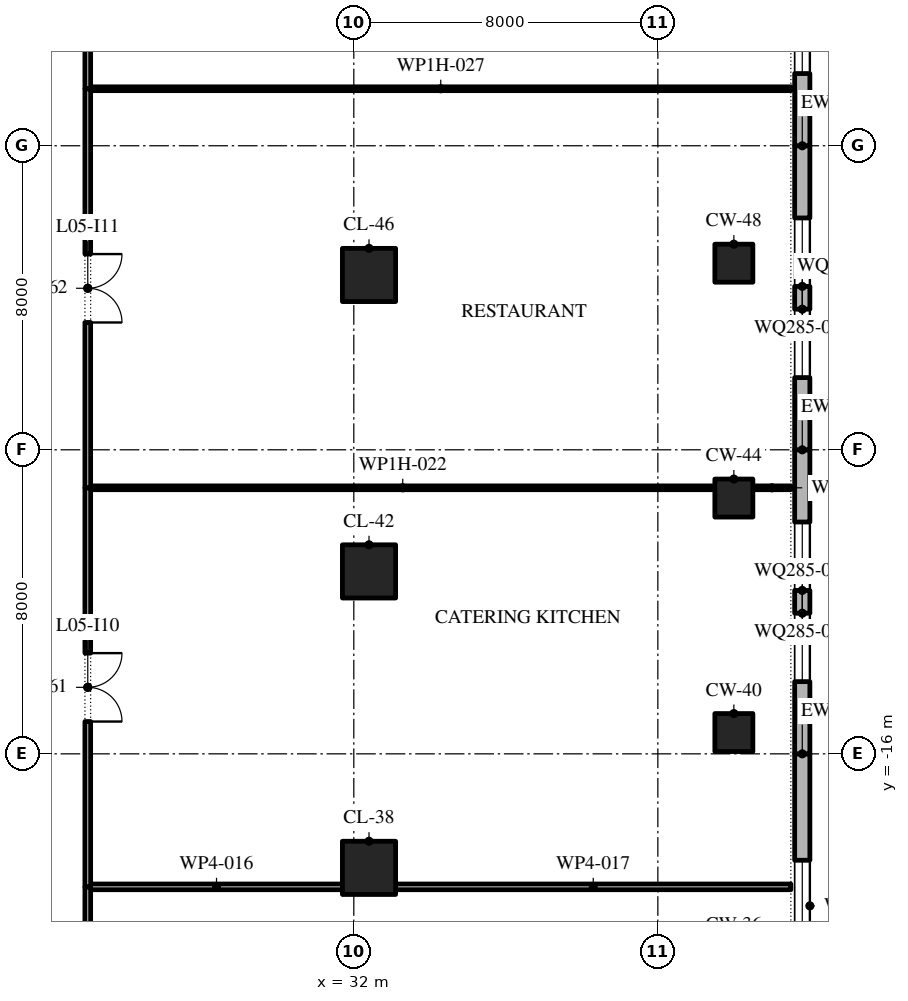
"""IFC4 building model, lengths in metres.
Left out: names, types, materials, properties, quantities, classifications, styles, units other than length and angle.
Written with IfcOpenShell. Run it as: python <this file> out.ifc"""

import sys

from ifc_helpers import new_model, si_unit, direction, frame, frame_2d, origin, origin_2d, place, context, subcontext, project, spatial, polyline, rectangle, outline, extrude, element, fill, save


model = new_model("IFC4")
c1 = context("Model", 3, precision=1e-05, world=origin(), true_north=direction((0.0, 1.0)))
c2 = subcontext(c1, "Body", "Model", "MODEL_VIEW")
j1 = project(units=[si_unit("LENGTHUNIT", "METRE"), si_unit("PLANEANGLEUNIT", "RADIAN")], contexts=[c1])
p1 = place(None, origin())
s1 = spatial("IfcSite", under=j1, at=p1, CompositionType="ELEMENT")
p2 = place(p1, origin())
s2 = spatial("IfcBuilding", under=s1, at=p2, CompositionType="ELEMENT")
p3 = place(p2, frame((0.0, 0.0, 28.8)))
s3 = spatial("IfcBuildingStorey", under=s2, at=p3, CompositionType="ELEMENT", Elevation=28.8)
p4 = place(p3, frame((32.4, -19.0, 0.0), z_axis=(0.0, 0.0, 1.0), x_axis=(1.0, 0.0, 0.0)))
e1 = element("IfcColumn", 1, at=p4, inside=s3, PredefinedType="COLUMN", context=c2, shape_type="SweptSolid", body=[
    extrude(rectangle(XDim=1.4, YDim=1.4, at=origin_2d()), origin(), (0.0, 0.0, 1.0), 4.8),
])
p5 = place(p3, frame((42.0, -15.44, 0.0), z_axis=(0.0, 0.0, 1.0), x_axis=(1.0, 0.0, 0.0)))
e2 = element("IfcColumn", 2, at=p5, inside=s3, PredefinedType="COLUMN", context=c2, shape_type="SweptSolid", body=[
    extrude(rectangle(XDim=1.0, YDim=1.0, at=origin_2d()), origin(), (0.0, 0.0, 1.0), 4.35),
])
p6 = place(p3, frame((32.4, -11.2, 0.0), z_axis=(0.0, 0.0, 1.0), x_axis=(1.0, 0.0, 0.0)))
e3 = element("IfcColumn", 3, at=p6, inside=s3, PredefinedType="COLUMN", context=c2, shape_type="SweptSolid", body=[
    extrude(rectangle(XDim=1.4, YDim=1.4, at=origin_2d()), origin(), (0.0, 0.0, 1.0), 4.8),
])
p7 = place(p3, frame((42.0, -9.27, 0.0), z_axis=(0.0, 0.0, 1.0), x_axis=(1.0, 0.0, 0.0)))
e4 = element("IfcColumn", 4, at=p7, inside=s3, PredefinedType="COLUMN", context=c2, shape_type="SweptSolid", body=[
    extrude(rectangle(XDim=1.0, YDim=1.0, at=origin_2d()), origin(), (0.0, 0.0, 1.0), 4.35),
])
p8 = place(p3, frame((32.4, -3.4, 0.0), z_axis=(0.0, 0.0, 1.0), x_axis=(1.0, 0.0, 0.0)))
e5 = element("IfcColumn", 5, at=p8, inside=s3, PredefinedType="COLUMN", context=c2, shape_type="SweptSolid", body=[
    extrude(rectangle(XDim=1.4, YDim=1.4, at=origin_2d()), origin(), (0.0, 0.0, 1.0), 4.8),
])
p9 = place(p3, frame((42.0, -3.09, 0.0), z_axis=(0.0, 0.0, 1.0), x_axis=(1.0, 0.0, 0.0)))
e6 = element("IfcColumn", 6, at=p9, inside=s3, PredefinedType="COLUMN", context=c2, shape_type="SweptSolid", body=[
    extrude(rectangle(XDim=1.0, YDim=1.0, at=origin_2d()), origin(), (0.0, 0.0, 1.0), 4.35),
])
p10 = place(p3, frame((43.8, -24.0, 0.0), z_axis=(0.0, 0.0, 1.0), x_axis=(0.0, 1.0, 0.0)))
e7 = element("IfcWall", 7, at=p10, inside=s3, PredefinedType="STANDARD", context=c2, shape_type="SweptSolid", body=[
    extrude(rectangle(XDim=8.0, YDim=0.4, at=frame_2d((4.0, 0.0))), origin(), (0.0, 0.0, 1.0), 4.35),
])
p11 = place(p10, frame((2.8, 0.0, 0.9)))
e8 = element("IfcOpeningElement", 8, at=p11, cuts=e7, PredefinedType="OPENING", context=c2, shape_type="SweptSolid", body=[
    extrude(outline(polyline([(0.0, 0.0), (2.4, 0.0), (2.4, 1.425), (2.378, 1.677), (2.312, 1.921), (2.205, 2.15), (2.06, 2.356), (1.881, 2.535), (1.674, 2.679), (1.444, 2.785), (1.2, 2.85), (0.956, 2.785), (0.726, 2.679), (0.519, 2.535), (0.34, 2.356), (0.195, 2.15), (0.088, 1.921), (0.022, 1.677), (0.0, 1.425), (0.0, 0.0)])), frame((0.0, 0.21, 0.0), z_axis=(0.0, -1.0, 0.0), x_axis=(1.0, 0.0, 0.0)), (0.0, 0.0, 1.0), 0.42),
])
p12 = place(p3, frame((43.8, -16.0, 0.0), z_axis=(0.0, 0.0, 1.0), x_axis=(0.0, 1.0, 0.0)))
e9 = element("IfcWall", 9, at=p12, inside=s3, PredefinedType="STANDARD", context=c2, shape_type="SweptSolid", body=[
    extrude(rectangle(XDim=8.0, YDim=0.4, at=frame_2d((4.0, 0.0))), origin(), (0.0, 0.0, 1.0), 4.35),
])
p13 = place(p12, frame((1.9, 0.0, 0.9)))
e10 = element("IfcOpeningElement", 10, at=p13, cuts=e9, PredefinedType="OPENING", context=c2, shape_type="SweptSolid", body=[
    extrude(outline(polyline([(0.0, 0.0), (1.8, 0.0), (1.8, 1.425), (1.784, 1.646), (1.738, 1.864), (1.661, 2.072), (1.556, 2.268), (1.425, 2.447), (1.269, 2.605), (1.093, 2.741), (0.9, 2.85), (0.707, 2.741), (0.531, 2.605), (0.375, 2.447), (0.244, 2.268), (0.139, 2.072), (0.062, 1.864), (0.016, 1.646), (0.0, 1.425), (0.0, 0.0)])), frame((0.0, 0.21, 0.0), z_axis=(0.0, -1.0, 0.0), x_axis=(1.0, 0.0, 0.0)), (0.0, 0.0, 1.0), 0.42),
])
p14 = place(p12, frame((4.3, 0.0, 0.9)))
e11 = element("IfcOpeningElement", 11, at=p14, cuts=e9, PredefinedType="OPENING", context=c2, shape_type="SweptSolid", body=[
    extrude(outline(polyline([(0.0, 0.0), (1.8, 0.0), (1.8, 1.425), (1.784, 1.646), (1.738, 1.864), (1.661, 2.072), (1.556, 2.268), (1.425, 2.447), (1.269, 2.605), (1.093, 2.741), (0.9, 2.85), (0.707, 2.741), (0.531, 2.605), (0.375, 2.447), (0.244, 2.268), (0.139, 2.072), (0.062, 1.864), (0.016, 1.646), (0.0, 1.425), (0.0, 0.0)])), frame((0.0, 0.21, 0.0), z_axis=(0.0, -1.0, 0.0), x_axis=(1.0, 0.0, 0.0)), (0.0, 0.0, 1.0), 0.42),
])
p15 = place(p3, frame((43.8, -8.0, 0.0), z_axis=(0.0, 0.0, 1.0), x_axis=(0.0, 1.0, 0.0)))
e12 = element("IfcWall", 12, at=p15, inside=s3, PredefinedType="STANDARD", context=c2, shape_type="SweptSolid", body=[
    extrude(rectangle(XDim=8.0, YDim=0.4, at=frame_2d((4.0, 0.0))), origin(), (0.0, 0.0, 1.0), 4.35),
])
p16 = place(p15, frame((1.9, 0.0, 0.9)))
e13 = element("IfcOpeningElement", 13, at=p16, cuts=e12, PredefinedType="OPENING", context=c2, shape_type="SweptSolid", body=[
    extrude(outline(polyline([(0.0, 0.0), (1.8, 0.0), (1.8, 1.425), (1.784, 1.646), (1.738, 1.864), (1.661, 2.072), (1.556, 2.268), (1.425, 2.447), (1.269, 2.605), (1.093, 2.741), (0.9, 2.85), (0.707, 2.741), (0.531, 2.605), (0.375, 2.447), (0.244, 2.268), (0.139, 2.072), (0.062, 1.864), (0.016, 1.646), (0.0, 1.425), (0.0, 0.0)])), frame((0.0, 0.21, 0.0), z_axis=(0.0, -1.0, 0.0), x_axis=(1.0, 0.0, 0.0)), (0.0, 0.0, 1.0), 0.42),
])
p17 = place(p15, frame((4.3, 0.0, 0.9)))
e14 = element("IfcOpeningElement", 14, at=p17, cuts=e12, PredefinedType="OPENING", context=c2, shape_type="SweptSolid", body=[
    extrude(outline(polyline([(0.0, 0.0), (1.8, 0.0), (1.8, 1.425), (1.784, 1.646), (1.738, 1.864), (1.661, 2.072), (1.556, 2.268), (1.425, 2.447), (1.269, 2.605), (1.093, 2.741), (0.9, 2.85), (0.707, 2.741), (0.531, 2.605), (0.375, 2.447), (0.244, 2.268), (0.139, 2.072), (0.062, 1.864), (0.016, 1.646), (0.0, 1.425), (0.0, 0.0)])), frame((0.0, 0.21, 0.0), z_axis=(0.0, -1.0, 0.0), x_axis=(1.0, 0.0, 0.0)), (0.0, 0.0, 1.0), 0.42),
])
p18 = place(p3, frame((43.8, 0.0, 0.0), z_axis=(0.0, 0.0, 1.0), x_axis=(0.0, 1.0, 0.0)))
e15 = element("IfcWall", 15, at=p18, inside=s3, PredefinedType="STANDARD", context=c2, shape_type="SweptSolid", body=[
    extrude(rectangle(XDim=8.0, YDim=0.4, at=frame_2d((4.0, 0.0))), origin(), (0.0, 0.0, 1.0), 4.35),
])
p19 = place(p18, frame((1.9, 0.0, 0.9)))
e16 = element("IfcOpeningElement", 16, at=p19, cuts=e15, PredefinedType="OPENING", context=c2, shape_type="SweptSolid", body=[
    extrude(outline(polyline([(0.0, 0.0), (1.8, 0.0), (1.8, 1.425), (1.784, 1.646), (1.738, 1.864), (1.661, 2.072), (1.556, 2.268), (1.425, 2.447), (1.269, 2.605), (1.093, 2.741), (0.9, 2.85), (0.707, 2.741), (0.531, 2.605), (0.375, 2.447), (0.244, 2.268), (0.139, 2.072), (0.062, 1.864), (0.016, 1.646), (0.0, 1.425), (0.0, 0.0)])), frame((0.0, 0.21, 0.0), z_axis=(0.0, -1.0, 0.0), x_axis=(1.0, 0.0, 0.0)), (0.0, 0.0, 1.0), 0.42),
])
p20 = place(p18, frame((4.3, 0.0, 0.9)))
e17 = element("IfcOpeningElement", 17, at=p20, cuts=e15, PredefinedType="OPENING", context=c2, shape_type="SweptSolid", body=[
    extrude(outline(polyline([(0.0, 0.0), (1.8, 0.0), (1.8, 1.425), (1.784, 1.646), (1.738, 1.864), (1.661, 2.072), (1.556, 2.268), (1.425, 2.447), (1.269, 2.605), (1.093, 2.741), (0.9, 2.85), (0.707, 2.741), (0.531, 2.605), (0.375, 2.447), (0.244, 2.268), (0.139, 2.072), (0.062, 1.864), (0.016, 1.646), (0.0, 1.425), (0.0, 0.0)])), frame((0.0, 0.21, 0.0), z_axis=(0.0, -1.0, 0.0), x_axis=(1.0, 0.0, 0.0)), (0.0, 0.0, 1.0), 0.42),
])
p21 = place(p3, frame((25.075, -19.5, 0.0), z_axis=(0.0, 0.0, 1.0), x_axis=(1.0, 0.0, 0.0)))
e18 = element("IfcWall", 18, at=p21, inside=s3, PredefinedType="PARTITIONING", context=c2, shape_type="SweptSolid", body=[
    extrude(rectangle(XDim=6.625, YDim=0.15, at=frame_2d((3.312, 0.0))), origin(), (0.0, 0.0, 1.0), 4.35),
])
p22 = place(p3, frame((33.1, -19.5, 0.0), z_axis=(0.0, 0.0, 1.0), x_axis=(1.0, 0.0, 0.0)))
e19 = element("IfcWall", 19, at=p22, inside=s3, PredefinedType="PARTITIONING", context=c2, shape_type="SweptSolid", body=[
    extrude(rectangle(XDim=10.4, YDim=0.15, at=frame_2d((5.2, 0.0))), origin(), (0.0, 0.0, 1.0), 4.35),
])
p23 = place(p3, frame((25.075, -9.0, 0.0), z_axis=(0.0, 0.0, 1.0), x_axis=(1.0, 0.0, 0.0)))
e20 = element("IfcWall", 20, at=p23, inside=s3, PredefinedType="PARTITIONING", context=c2, shape_type="SweptSolid", body=[
    extrude(rectangle(XDim=16.425, YDim=0.1, at=frame_2d((8.212, 0.0))), origin(), (0.0, 0.0, 1.0), 4.35),
])
p24 = place(p3, frame((42.5, -9.0, 0.0), z_axis=(0.0, 0.0, 1.0), x_axis=(1.0, 0.0, 0.0)))
e21 = element("IfcWall", 21, at=p24, inside=s3, PredefinedType="PARTITIONING", context=c2, shape_type="SweptSolid", body=[
    extrude(rectangle(XDim=1.0, YDim=0.1, at=frame_2d((0.5, 0.0))), origin(), (0.0, 0.0, 1.0), 4.35),
])
p25 = place(p3, frame((25.075, 1.5, 0.0), z_axis=(0.0, 0.0, 1.0), x_axis=(1.0, 0.0, 0.0)))
e22 = element("IfcWall", 22, at=p25, inside=s3, PredefinedType="PARTITIONING", context=c2, shape_type="SweptSolid", body=[
    extrude(rectangle(XDim=18.425, YDim=0.1, at=frame_2d((9.212, 0.0))), origin(), (0.0, 0.0, 1.0), 4.35),
])
p26 = place(p3, frame((25.0, -28.575, 0.0), z_axis=(0.0, 0.0, 1.0), x_axis=(0.0, 1.0, 0.0)))
e23 = element("IfcWall", 23, at=p26, inside=s3, PredefinedType="PARTITIONING", context=c2, shape_type="SweptSolid", body=[
    extrude(rectangle(XDim=9.075, YDim=0.15, at=frame_2d((4.538, 0.0))), origin(), (0.0, 0.0, 1.0), 4.35),
])
p27 = place(p26, frame((3.637, 0.0, 0.0)))
e24 = element("IfcOpeningElement", 24, at=p27, cuts=e23, PredefinedType="OPENING", context=c2, shape_type="SweptSolid", body=[
    extrude(rectangle(XDim=1.8, YDim=2.1, at=frame_2d((0.9, 1.05))), frame((0.0, 0.085, 0.0), z_axis=(0.0, -1.0, 0.0), x_axis=(1.0, 0.0, 0.0)), (0.0, 0.0, 1.0), 0.17),
])
p28 = place(p3, frame((25.0, -19.5, 0.0), z_axis=(0.0, 0.0, 1.0), x_axis=(0.0, 1.0, 0.0)))
e25 = element("IfcWall", 25, at=p28, inside=s3, PredefinedType="PARTITIONING", context=c2, shape_type="SweptSolid", body=[
    extrude(rectangle(XDim=10.5, YDim=0.15, at=frame_2d((5.25, 0.0))), origin(), (0.0, 0.0, 1.0), 4.35),
])
p29 = place(p28, frame((4.35, 0.0, 0.0)))
e26 = element("IfcOpeningElement", 26, at=p29, cuts=e25, PredefinedType="OPENING", context=c2, shape_type="SweptSolid", body=[
    extrude(rectangle(XDim=1.8, YDim=2.1, at=frame_2d((0.9, 1.05))), frame((0.0, 0.085, 0.0), z_axis=(0.0, -1.0, 0.0), x_axis=(1.0, 0.0, 0.0)), (0.0, 0.0, 1.0), 0.17),
])
p30 = place(p3, frame((25.0, -9.0, 0.0), z_axis=(0.0, 0.0, 1.0), x_axis=(0.0, 1.0, 0.0)))
e27 = element("IfcWall", 27, at=p30, inside=s3, PredefinedType="PARTITIONING", context=c2, shape_type="SweptSolid", body=[
    extrude(rectangle(XDim=10.5, YDim=0.15, at=frame_2d((5.25, 0.0))), origin(), (0.0, 0.0, 1.0), 4.35),
])
p31 = place(p30, frame((4.35, 0.0, 0.0)))
e28 = element("IfcOpeningElement", 28, at=p31, cuts=e27, PredefinedType="OPENING", context=c2, shape_type="SweptSolid", body=[
    extrude(rectangle(XDim=1.8, YDim=2.1, at=frame_2d((0.9, 1.05))), frame((0.0, 0.085, 0.0), z_axis=(0.0, -1.0, 0.0), x_axis=(1.0, 0.0, 0.0)), (0.0, 0.0, 1.0), 0.17),
])
p32 = place(p3, frame((25.0, 1.5, 0.0), z_axis=(0.0, 0.0, 1.0), x_axis=(0.0, 1.0, 0.0)))
e29 = element("IfcWall", 29, at=p32, inside=s3, PredefinedType="PARTITIONING", context=c2, shape_type="SweptSolid", body=[
    extrude(rectangle(XDim=11.0, YDim=0.15, at=frame_2d((5.5, 0.0))), origin(), (0.0, 0.0, 1.0), 4.35),
])
p33 = place(p32, frame((4.6, 0.0, 0.0)))
e30 = element("IfcOpeningElement", 30, at=p33, cuts=e29, PredefinedType="OPENING", context=c2, shape_type="SweptSolid", body=[
    extrude(rectangle(XDim=1.8, YDim=2.1, at=frame_2d((0.9, 1.05))), frame((0.0, 0.085, 0.0), z_axis=(0.0, -1.0, 0.0), x_axis=(1.0, 0.0, 0.0)), (0.0, 0.0, 1.0), 0.17),
])
p34 = place(p11, origin())
e31 = element("IfcWindow", 31, at=p34, inside=s3, PartitioningType="DOUBLE_PANEL_VERTICAL", PredefinedType="WINDOW", context=c2, shape_type="SweptSolid", body=[
    extrude(outline(polyline([(0.0, 0.0), (2.4, 0.0), (2.4, 1.425), (2.378, 1.677), (2.312, 1.921), (2.205, 2.15), (2.06, 2.356), (1.881, 2.535), (1.674, 2.679), (1.444, 2.785), (1.2, 2.85), (0.956, 2.785), (0.726, 2.679), (0.519, 2.535), (0.34, 2.356), (0.195, 2.15), (0.088, 1.921), (0.022, 1.677), (0.0, 1.425), (0.0, 0.0)])), frame((0.0, 0.03, 0.0), z_axis=(0.0, -1.0, 0.0), x_axis=(1.0, 0.0, 0.0)), (0.0, 0.0, 1.0), 0.06),
])
fill(e8, e31)
p35 = place(p13, origin())
e32 = element("IfcWindow", 32, at=p35, inside=s3, PartitioningType="DOUBLE_PANEL_VERTICAL", PredefinedType="WINDOW", context=c2, shape_type="SweptSolid", body=[
    extrude(outline(polyline([(0.0, 0.0), (1.8, 0.0), (1.8, 1.425), (1.784, 1.646), (1.738, 1.864), (1.661, 2.072), (1.556, 2.268), (1.425, 2.447), (1.269, 2.605), (1.093, 2.741), (0.9, 2.85), (0.707, 2.741), (0.531, 2.605), (0.375, 2.447), (0.244, 2.268), (0.139, 2.072), (0.062, 1.864), (0.016, 1.646), (0.0, 1.425), (0.0, 0.0)])), frame((0.0, 0.03, 0.0), z_axis=(0.0, -1.0, 0.0), x_axis=(1.0, 0.0, 0.0)), (0.0, 0.0, 1.0), 0.06),
])
fill(e10, e32)
p36 = place(p14, origin())
e33 = element("IfcWindow", 33, at=p36, inside=s3, PartitioningType="DOUBLE_PANEL_VERTICAL", PredefinedType="WINDOW", context=c2, shape_type="SweptSolid", body=[
    extrude(outline(polyline([(0.0, 0.0), (1.8, 0.0), (1.8, 1.425), (1.784, 1.646), (1.738, 1.864), (1.661, 2.072), (1.556, 2.268), (1.425, 2.447), (1.269, 2.605), (1.093, 2.741), (0.9, 2.85), (0.707, 2.741), (0.531, 2.605), (0.375, 2.447), (0.244, 2.268), (0.139, 2.072), (0.062, 1.864), (0.016, 1.646), (0.0, 1.425), (0.0, 0.0)])), frame((0.0, 0.03, 0.0), z_axis=(0.0, -1.0, 0.0), x_axis=(1.0, 0.0, 0.0)), (0.0, 0.0, 1.0), 0.06),
])
fill(e11, e33)
p37 = place(p16, origin())
e34 = element("IfcWindow", 34, at=p37, inside=s3, PartitioningType="DOUBLE_PANEL_VERTICAL", PredefinedType="WINDOW", context=c2, shape_type="SweptSolid", body=[
    extrude(outline(polyline([(0.0, 0.0), (1.8, 0.0), (1.8, 1.425), (1.784, 1.646), (1.738, 1.864), (1.661, 2.072), (1.556, 2.268), (1.425, 2.447), (1.269, 2.605), (1.093, 2.741), (0.9, 2.85), (0.707, 2.741), (0.531, 2.605), (0.375, 2.447), (0.244, 2.268), (0.139, 2.072), (0.062, 1.864), (0.016, 1.646), (0.0, 1.425), (0.0, 0.0)])), frame((0.0, 0.03, 0.0), z_axis=(0.0, -1.0, 0.0), x_axis=(1.0, 0.0, 0.0)), (0.0, 0.0, 1.0), 0.06),
])
fill(e13, e34)
p38 = place(p17, origin())
e35 = element("IfcWindow", 35, at=p38, inside=s3, PartitioningType="DOUBLE_PANEL_VERTICAL", PredefinedType="WINDOW", context=c2, shape_type="SweptSolid", body=[
    extrude(outline(polyline([(0.0, 0.0), (1.8, 0.0), (1.8, 1.425), (1.784, 1.646), (1.738, 1.864), (1.661, 2.072), (1.556, 2.268), (1.425, 2.447), (1.269, 2.605), (1.093, 2.741), (0.9, 2.85), (0.707, 2.741), (0.531, 2.605), (0.375, 2.447), (0.244, 2.268), (0.139, 2.072), (0.062, 1.864), (0.016, 1.646), (0.0, 1.425), (0.0, 0.0)])), frame((0.0, 0.03, 0.0), z_axis=(0.0, -1.0, 0.0), x_axis=(1.0, 0.0, 0.0)), (0.0, 0.0, 1.0), 0.06),
])
fill(e14, e35)
p39 = place(p19, origin())
e36 = element("IfcWindow", 36, at=p39, inside=s3, PartitioningType="DOUBLE_PANEL_VERTICAL", PredefinedType="WINDOW", context=c2, shape_type="SweptSolid", body=[
    extrude(outline(polyline([(0.0, 0.0), (1.8, 0.0), (1.8, 1.425), (1.784, 1.646), (1.738, 1.864), (1.661, 2.072), (1.556, 2.268), (1.425, 2.447), (1.269, 2.605), (1.093, 2.741), (0.9, 2.85), (0.707, 2.741), (0.531, 2.605), (0.375, 2.447), (0.244, 2.268), (0.139, 2.072), (0.062, 1.864), (0.016, 1.646), (0.0, 1.425), (0.0, 0.0)])), frame((0.0, 0.03, 0.0), z_axis=(0.0, -1.0, 0.0), x_axis=(1.0, 0.0, 0.0)), (0.0, 0.0, 1.0), 0.06),
])
fill(e16, e36)
p40 = place(p29, frame((1.8, 0.0, 0.0), z_axis=(0.0, 0.0, 1.0), x_axis=(-1.0, 0.0, 0.0)))
e37 = element("IfcDoor", 37, at=p40, inside=s3, OperationType="SINGLE_SWING_LEFT", PredefinedType="DOOR", context=c2, shape_type="SweptSolid", body=[
    extrude(rectangle(XDim=1.8, YDim=2.1, at=frame_2d((0.9, 1.05))), frame((0.0, 0.025, 0.0), z_axis=(0.0, -1.0, 0.0), x_axis=(1.0, 0.0, 0.0)), (0.0, 0.0, 1.0), 0.05),
])
fill(e26, e37)
p41 = place(p31, frame((1.8, 0.0, 0.0), z_axis=(0.0, 0.0, 1.0), x_axis=(-1.0, 0.0, 0.0)))
e38 = element("IfcDoor", 38, at=p41, inside=s3, OperationType="SINGLE_SWING_LEFT", PredefinedType="DOOR", context=c2, shape_type="SweptSolid", body=[
    extrude(rectangle(XDim=1.8, YDim=2.1, at=frame_2d((0.9, 1.05))), frame((0.0, 0.025, 0.0), z_axis=(0.0, -1.0, 0.0), x_axis=(1.0, 0.0, 0.0)), (0.0, 0.0, 1.0), 0.05),
])
fill(e28, e38)
save(model, sys.argv[1])
